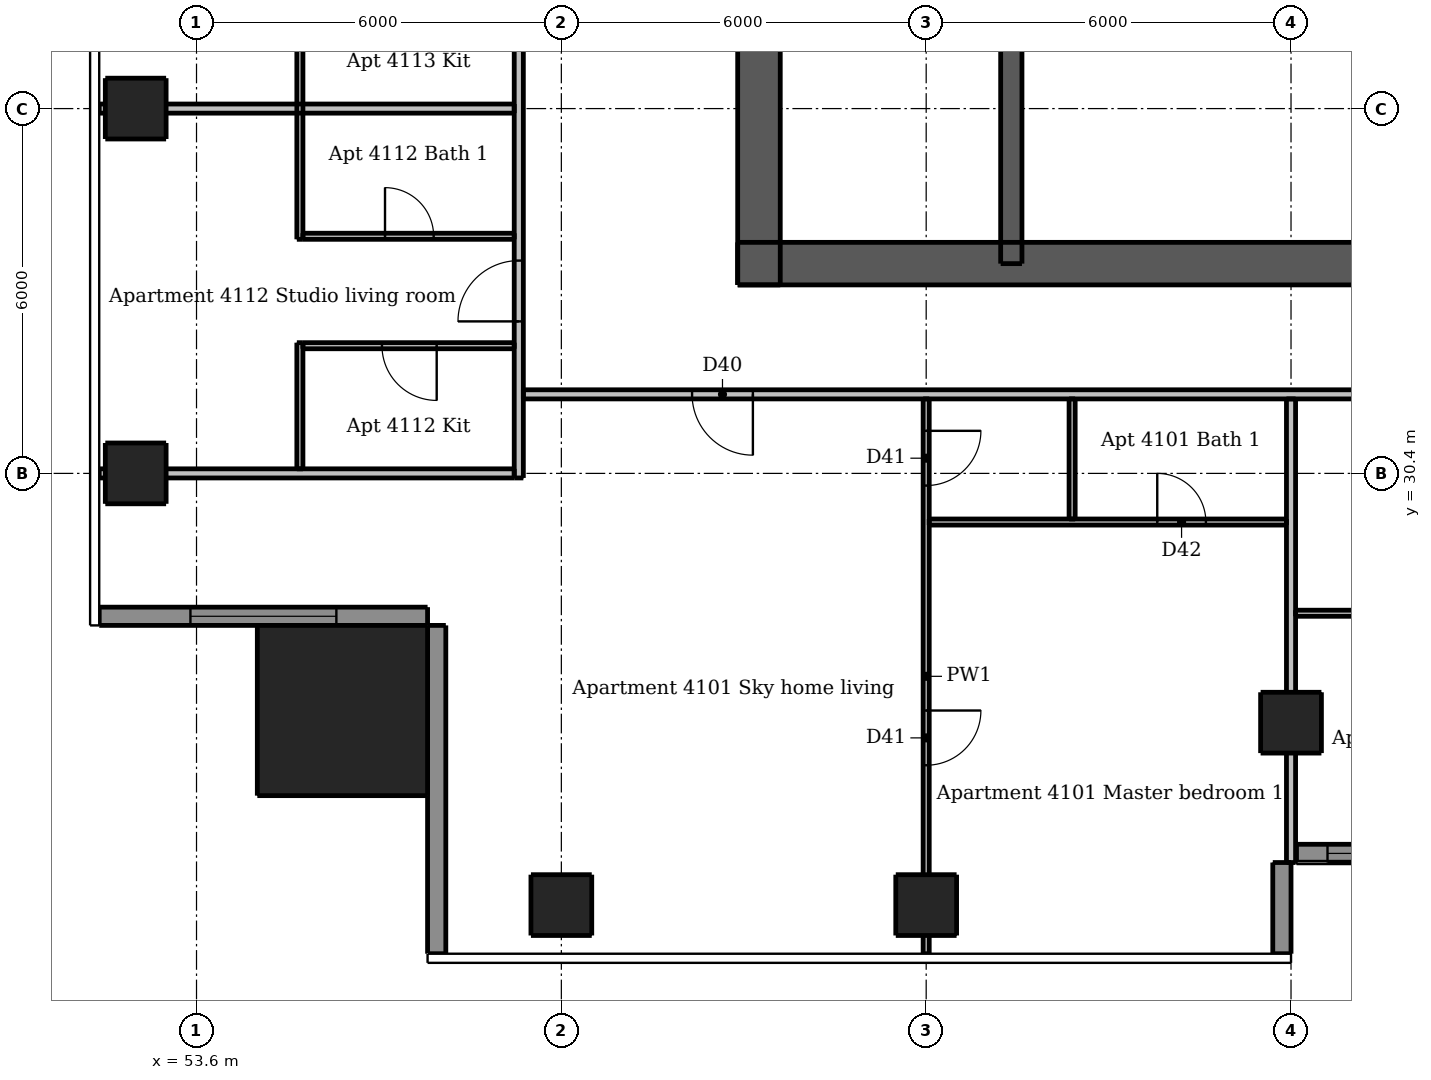
"""IFC4 building model, lengths in metres.
Left out: names, types, materials, properties, quantities, classifications, styles, units other than length and angle.
Written with IfcOpenShell. Run it as: python <this file> out.ifc"""

import sys

from ifc_helpers import new_model, si_unit, direction, frame, frame_2d, origin, origin_2d, place, context, subcontext, project, spatial, rectangle, extrude, element, fill, save


model = new_model("IFC4")
c1 = context("Model", 3, precision=1e-05, world=origin(), true_north=direction((0.0, 1.0)))
c2 = subcontext(c1, "Body", "Model", "MODEL_VIEW")
j1 = project(units=[si_unit("LENGTHUNIT", "METRE"), si_unit("PLANEANGLEUNIT", "RADIAN")], contexts=[c1])
p1 = place(None, origin())
s1 = spatial("IfcSite", under=j1, at=p1, CompositionType="ELEMENT")
p2 = place(p1, origin())
s2 = spatial("IfcBuilding", under=s1, at=p2, CompositionType="ELEMENT")
p3 = place(p2, frame((0.0, 0.0, 154.9)))
s3 = spatial("IfcBuildingStorey", under=s2, at=p3, CompositionType="ELEMENT", Elevation=154.9)
p4 = place(p3, frame((62.5, 33.85, 0.0), z_axis=(0.0, 0.0, 1.0), x_axis=(1.0, 0.0, 0.0)))
e1 = element("IfcWall", 1, at=p4, inside=s3, PredefinedType="SHEAR", context=c2, shape_type="SweptSolid", body=[
    extrude(rectangle(XDim=24.0, YDim=0.7, at=frame_2d((12.0, 0.0))), origin(), (0.0, 0.0, 1.0), 3.05),
])
p5 = place(p4, frame((1.962, 0.0, 0.0)))
e2 = element("IfcOpeningElement", 2, at=p5, cuts=e1, PredefinedType="OPENING", context=c2, shape_type="SweptSolid", body=[
    extrude(rectangle(XDim=1.1, YDim=2.1, at=frame_2d((0.55, 1.05))), frame((0.0, 0.36, 0.0), z_axis=(0.0, -1.0, 0.0), x_axis=(1.0, 0.0, 0.0)), (0.0, 0.0, 1.0), 0.72),
])
p6 = place(p4, frame((20.938, 0.0, 0.0)))
e3 = element("IfcOpeningElement", 3, at=p6, cuts=e1, PredefinedType="OPENING", context=c2, shape_type="SweptSolid", body=[
    extrude(rectangle(XDim=1.1, YDim=2.1, at=frame_2d((0.55, 1.05))), frame((0.0, 0.36, 0.0), z_axis=(0.0, -1.0, 0.0), x_axis=(1.0, 0.0, 0.0)), (0.0, 0.0, 1.0), 0.72),
])
p7 = place(p4, frame((8.0, 0.0, 0.0)))
e4 = element("IfcOpeningElement", 4, at=p7, cuts=e1, PredefinedType="OPENING", context=c2, shape_type="SweptSolid", body=[
    extrude(rectangle(XDim=1.1, YDim=2.1, at=frame_2d((0.55, 1.05))), frame((0.0, 0.36, 0.0), z_axis=(0.0, -1.0, 0.0), x_axis=(1.0, 0.0, 0.0)), (0.0, 0.0, 1.0), 0.72),
])
p8 = place(p4, frame((13.512, 0.0, 0.0)))
e5 = element("IfcOpeningElement", 5, at=p8, cuts=e1, PredefinedType="OPENING", context=c2, shape_type="SweptSolid", body=[
    extrude(rectangle(XDim=0.9, YDim=2.1, at=frame_2d((0.45, 1.05))), frame((0.0, 0.36, 0.0), z_axis=(0.0, -1.0, 0.0), x_axis=(1.0, 0.0, 0.0)), (0.0, 0.0, 1.0), 0.72),
])
p9 = place(p4, frame((17.087, 0.0, 0.0)))
e6 = element("IfcOpeningElement", 6, at=p9, cuts=e1, PredefinedType="OPENING", context=c2, shape_type="SweptSolid", body=[
    extrude(rectangle(XDim=0.9, YDim=2.1, at=frame_2d((0.45, 1.05))), frame((0.0, 0.36, 0.0), z_axis=(0.0, -1.0, 0.0), x_axis=(1.0, 0.0, 0.0)), (0.0, 0.0, 1.0), 0.72),
])
p10 = place(p3, frame((62.85, 33.5, 0.0), z_axis=(0.0, 0.0, 1.0), x_axis=(0.0, 1.0, 0.0)))
e7 = element("IfcWall", 7, at=p10, inside=s3, PredefinedType="SHEAR", context=c2, shape_type="SweptSolid", body=[
    extrude(rectangle(XDim=24.0, YDim=0.7, at=frame_2d((12.0, 0.0))), origin(), (0.0, 0.0, 1.0), 3.05),
])
p11 = place(p10, frame((11.2, 0.0, 0.0)))
e8 = element("IfcOpeningElement", 8, at=p11, cuts=e7, PredefinedType="OPENING", context=c2, shape_type="SweptSolid", body=[
    extrude(rectangle(XDim=1.6, YDim=2.1, at=frame_2d((0.8, 1.05))), frame((0.0, 0.36, 0.0), z_axis=(0.0, -1.0, 0.0), x_axis=(1.0, 0.0, 0.0)), (0.0, 0.0, 1.0), 0.72),
])
p12 = place(p3, frame((67.0, 33.85, 0.0), z_axis=(0.0, 0.0, 1.0), x_axis=(0.0, 1.0, 0.0)))
e9 = element("IfcWall", 9, at=p12, inside=s3, PredefinedType="SHEAR", context=c2, shape_type="SweptSolid", body=[
    extrude(rectangle(XDim=10.05, YDim=0.35, at=frame_2d((5.025, 0.0))), origin(), (0.0, 0.0, 1.0), 3.05),
])
p13 = place(p12, frame((0.55, 0.0, 0.0)))
e10 = element("IfcOpeningElement", 10, at=p13, cuts=e9, PredefinedType="OPENING", context=c2, shape_type="SweptSolid", body=[
    extrude(rectangle(XDim=1.1, YDim=2.1, at=frame_2d((0.55, 1.05))), frame((0.0, 0.185, 0.0), z_axis=(0.0, -1.0, 0.0), x_axis=(1.0, 0.0, 0.0)), (0.0, 0.0, 1.0), 0.37),
])
for number, where, z_axis, x_axis in (
    (11, (59.6, 23.3, 0.0), (0.0, 0.0, 1.0), (1.0, 0.0, 0.0)),
    (12, (65.6, 23.3, 0.0), (0.0, 0.0, 1.0), (1.0, 0.0, 0.0)),
    (13, (71.6, 26.3, 0.0), (0.0, 0.0, 1.0), (1.0, 0.0, 0.0)),
    (14, (52.6, 30.4, 0.0), (0.0, 0.0, 1.0), (1.0, 0.0, 0.0)),
    (15, (52.6, 36.4, 0.0), (0.0, 0.0, 1.0), (1.0, 0.0, 0.0)),
):
    element("IfcColumn", number, at=place(p3, frame(where, z_axis=z_axis, x_axis=x_axis)), inside=s3, PredefinedType="COLUMN", context=c2, shape_type="SweptSolid", body=[
        extrude(rectangle(XDim=1.0, YDim=1.0, at=origin_2d()), origin(), (0.0, 0.0, 1.0), 3.05),
    ])
p14 = place(p3, frame((56.0, 26.5, 0.0), z_axis=(0.0, 0.0, 1.0), x_axis=(1.0, 0.0, 0.0)))
e16 = element("IfcColumn", 16, at=p14, inside=s3, PredefinedType="COLUMN", context=c2, shape_type="SweptSolid", body=[
    extrude(rectangle(XDim=2.8, YDim=2.8, at=origin_2d()), origin(), (0.0, 0.0, 1.0), 3.3),
])
p15 = place(p3, frame((71.45, 22.5, 0.0), z_axis=(0.0, 0.0, 1.0), x_axis=(0.0, 1.0, 0.0)))
e17 = element("IfcWall", 17, at=p15, inside=s3, PredefinedType="SOLIDWALL", context=c2, shape_type="SweptSolid", body=[
    extrude(rectangle(XDim=1.5, YDim=0.3, at=frame_2d((0.75, 0.0))), origin(), (0.0, 0.0, 1.0), 3.05),
])
p16 = place(p3, frame((52.0, 28.05, 0.0), z_axis=(0.0, 0.0, 1.0), x_axis=(1.0, 0.0, 0.0)))
e18 = element("IfcWall", 18, at=p16, inside=s3, PredefinedType="SOLIDWALL", context=c2, shape_type="SweptSolid", body=[
    extrude(rectangle(XDim=5.4, YDim=0.3, at=frame_2d((2.7, 0.0))), origin(), (0.0, 0.0, 1.0), 3.05),
])
p17 = place(p16, frame((1.5, 0.0, 0.15)))
e19 = element("IfcOpeningElement", 19, at=p17, cuts=e18, PredefinedType="OPENING", context=c2, shape_type="SweptSolid", body=[
    extrude(rectangle(XDim=2.4, YDim=2.1, at=frame_2d((1.2, 1.05))), frame((0.0, 0.16, 0.0), z_axis=(0.0, -1.0, 0.0), x_axis=(1.0, 0.0, 0.0)), (0.0, 0.0, 1.0), 0.32),
])
p18 = place(p3, frame((57.55, 27.9, 0.0), z_axis=(0.0, 0.0, 1.0), x_axis=(0.0, -1.0, 0.0)))
e20 = element("IfcWall", 20, at=p18, inside=s3, PredefinedType="SOLIDWALL", context=c2, shape_type="SweptSolid", body=[
    extrude(rectangle(XDim=5.4, YDim=0.3, at=frame_2d((2.7, 0.0))), origin(), (0.0, 0.0, 1.0), 3.05),
])
p19 = place(p3, frame((71.69, 24.15, 0.0), z_axis=(0.0, 0.0, 1.0), x_axis=(1.0, 0.0, 0.0)))
e21 = element("IfcWall", 21, at=p19, inside=s3, PredefinedType="SOLIDWALL", context=c2, shape_type="SweptSolid", body=[
    extrude(rectangle(XDim=5.91, YDim=0.3, at=frame_2d((2.955, 0.0))), origin(), (0.0, 0.0, 1.0), 3.05),
])
p20 = place(p19, frame((0.51, 0.0, 0.15)))
e22 = element("IfcOpeningElement", 22, at=p20, cuts=e21, PredefinedType="OPENING", context=c2, shape_type="SweptSolid", body=[
    extrude(rectangle(XDim=1.8, YDim=2.1, at=frame_2d((0.9, 1.05))), frame((0.0, 0.16, 0.0), z_axis=(0.0, -1.0, 0.0), x_axis=(1.0, 0.0, 0.0)), (0.0, 0.0, 1.0), 0.32),
])
p21 = place(p19, frame((3.51, 0.0, 0.15)))
e23 = element("IfcOpeningElement", 23, at=p21, cuts=e21, PredefinedType="OPENING", context=c2, shape_type="SweptSolid", body=[
    extrude(rectangle(XDim=1.8, YDim=2.1, at=frame_2d((0.9, 1.05))), frame((0.0, 0.16, 0.0), z_axis=(0.0, -1.0, 0.0), x_axis=(1.0, 0.0, 0.0)), (0.0, 0.0, 1.0), 0.32),
])
p22 = place(p3, frame((55.3, 30.475, 0.0), z_axis=(0.0, 0.0, 1.0), x_axis=(0.0, 1.0, 0.0)))
e24 = element("IfcWall", 24, at=p22, inside=s3, PredefinedType="PARTITIONING", context=c2, shape_type="SweptSolid", body=[
    extrude(rectangle(XDim=2.075, YDim=0.1, at=frame_2d((1.038, 0.0))), origin(), (0.0, 0.0, 1.0), 3.05),
])
p23 = place(p3, frame((55.3, 34.25, 0.0), z_axis=(0.0, 0.0, 1.0), x_axis=(0.0, 1.0, 0.0)))
e25 = element("IfcWall", 25, at=p23, inside=s3, PredefinedType="PARTITIONING", context=c2, shape_type="SweptSolid", body=[
    extrude(rectangle(XDim=4.3, YDim=0.1, at=frame_2d((2.15, 0.0))), origin(), (0.0, 0.0, 1.0), 3.05),
])
p24 = place(p3, frame((65.6, 31.625, 0.0), z_axis=(0.0, 0.0, 1.0), x_axis=(0.0, -1.0, 0.0)))
e26 = element("IfcWall", 26, at=p24, inside=s3, PredefinedType="PARTITIONING", context=c2, shape_type="SweptSolid", body=[
    extrude(rectangle(XDim=9.125, YDim=0.1, at=frame_2d((4.562, 0.0))), origin(), (0.0, 0.0, 1.0), 2.516),
])
p25 = place(p24, frame((0.525, 0.0, 0.0)))
e27 = element("IfcOpeningElement", 27, at=p25, cuts=e26, PredefinedType="OPENING", context=c2, shape_type="SweptSolid", body=[
    extrude(rectangle(XDim=0.9, YDim=2.1, at=frame_2d((0.45, 1.05))), frame((0.0, 0.06, 0.0), z_axis=(0.0, -1.0, 0.0), x_axis=(1.0, 0.0, 0.0)), (0.0, 0.0, 1.0), 0.12),
])
p26 = place(p24, frame((5.125, 0.0, 0.0)))
e28 = element("IfcOpeningElement", 28, at=p26, cuts=e26, PredefinedType="OPENING", context=c2, shape_type="SweptSolid", body=[
    extrude(rectangle(XDim=0.9, YDim=2.1, at=frame_2d((0.45, 1.05))), frame((0.0, 0.06, 0.0), z_axis=(0.0, -1.0, 0.0), x_axis=(1.0, 0.0, 0.0)), (0.0, 0.0, 1.0), 0.12),
])
p27 = place(p3, frame((68.0, 29.65, 0.0), z_axis=(0.0, 0.0, 1.0), x_axis=(0.0, 1.0, 0.0)))
e29 = element("IfcWall", 29, at=p27, inside=s3, PredefinedType="PARTITIONING", context=c2, shape_type="SweptSolid", body=[
    extrude(rectangle(XDim=1.975, YDim=0.1, at=frame_2d((0.988, 0.0))), origin(), (0.0, 0.0, 1.0), 3.05),
])
p28 = place(p3, frame((55.35, 34.3, 0.0), z_axis=(0.0, 0.0, 1.0), x_axis=(1.0, 0.0, 0.0)))
e30 = element("IfcWall", 30, at=p28, inside=s3, PredefinedType="PARTITIONING", context=c2, shape_type="SweptSolid", body=[
    extrude(rectangle(XDim=3.475, YDim=0.1, at=frame_2d((1.737, 0.0))), origin(), (0.0, 0.0, 1.0), 3.05),
])
p29 = place(p28, frame((1.35, 0.0, 0.0)))
e31 = element("IfcOpeningElement", 31, at=p29, cuts=e30, PredefinedType="OPENING", context=c2, shape_type="SweptSolid", body=[
    extrude(rectangle(XDim=0.8, YDim=2.1, at=frame_2d((0.4, 1.05))), frame((0.0, 0.06, 0.0), z_axis=(0.0, -1.0, 0.0), x_axis=(1.0, 0.0, 0.0)), (0.0, 0.0, 1.0), 0.12),
])
p30 = place(p3, frame((58.825, 32.5, 0.0), z_axis=(0.0, 0.0, 1.0), x_axis=(-1.0, 0.0, 0.0)))
e32 = element("IfcWall", 32, at=p30, inside=s3, PredefinedType="PARTITIONING", context=c2, shape_type="SweptSolid", body=[
    extrude(rectangle(XDim=3.475, YDim=0.1, at=frame_2d((1.737, 0.0))), origin(), (0.0, 0.0, 1.0), 3.05),
])
p31 = place(p30, frame((1.275, 0.0, 0.0)))
e33 = element("IfcOpeningElement", 33, at=p31, cuts=e32, PredefinedType="OPENING", context=c2, shape_type="SweptSolid", body=[
    extrude(rectangle(XDim=0.9, YDim=2.1, at=frame_2d((0.45, 1.05))), frame((0.0, 0.06, 0.0), z_axis=(0.0, -1.0, 0.0), x_axis=(1.0, 0.0, 0.0)), (0.0, 0.0, 1.0), 0.12),
])
p32 = place(p3, frame((65.65, 29.6, 0.0), z_axis=(0.0, 0.0, 1.0), x_axis=(1.0, 0.0, 0.0)))
e34 = element("IfcWall", 34, at=p32, inside=s3, PredefinedType="PARTITIONING", context=c2, shape_type="SweptSolid", body=[
    extrude(rectangle(XDim=5.875, YDim=0.1, at=frame_2d((2.938, 0.0))), origin(), (0.0, 0.0, 1.0), 3.05),
])
p33 = place(p32, frame((3.75, 0.0, 0.0)))
e35 = element("IfcOpeningElement", 35, at=p33, cuts=e34, PredefinedType="OPENING", context=c2, shape_type="SweptSolid", body=[
    extrude(rectangle(XDim=0.8, YDim=2.1, at=frame_2d((0.4, 1.05))), frame((0.0, 0.06, 0.0), z_axis=(0.0, -1.0, 0.0), x_axis=(1.0, 0.0, 0.0)), (0.0, 0.0, 1.0), 0.12),
])
p34 = place(p3, frame((71.675, 28.1, 0.0), z_axis=(0.0, 0.0, 1.0), x_axis=(1.0, 0.0, 0.0)))
e36 = element("IfcWall", 36, at=p34, inside=s3, PredefinedType="PARTITIONING", context=c2, shape_type="SweptSolid", body=[
    extrude(rectangle(XDim=1.975, YDim=0.1, at=frame_2d((0.987, 0.0))), origin(), (0.0, 0.0, 1.0), 3.05),
])
p35 = place(p3, frame((58.9, 30.325, 0.0), z_axis=(0.0, 0.0, 1.0), x_axis=(0.0, 1.0, 0.0)))
e37 = element("IfcWall", 37, at=p35, inside=s3, PredefinedType="PARTITIONING", context=c2, shape_type="SweptSolid", body=[
    extrude(rectangle(XDim=30.85, YDim=0.15, at=frame_2d((15.425, 0.0))), origin(), (0.0, 0.0, 1.0), 3.05),
])
p36 = place(p35, frame((2.575, 0.0, 0.0)))
e38 = element("IfcOpeningElement", 38, at=p36, cuts=e37, PredefinedType="OPENING", context=c2, shape_type="SweptSolid", body=[
    extrude(rectangle(XDim=1.0, YDim=2.1, at=frame_2d((0.5, 1.05))), frame((0.0, 0.085, 0.0), z_axis=(0.0, -1.0, 0.0), x_axis=(1.0, 0.0, 0.0)), (0.0, 0.0, 1.0), 0.17),
])
p37 = place(p35, frame((8.575, 0.0, 0.0)))
e39 = element("IfcOpeningElement", 39, at=p37, cuts=e37, PredefinedType="OPENING", context=c2, shape_type="SweptSolid", body=[
    extrude(rectangle(XDim=1.0, YDim=2.1, at=frame_2d((0.5, 1.05))), frame((0.0, 0.085, 0.0), z_axis=(0.0, -1.0, 0.0), x_axis=(1.0, 0.0, 0.0)), (0.0, 0.0, 1.0), 0.17),
])
p38 = place(p35, frame((14.575, 0.0, 0.0)))
e40 = element("IfcOpeningElement", 40, at=p38, cuts=e37, PredefinedType="OPENING", context=c2, shape_type="SweptSolid", body=[
    extrude(rectangle(XDim=1.0, YDim=2.1, at=frame_2d((0.5, 1.05))), frame((0.0, 0.085, 0.0), z_axis=(0.0, -1.0, 0.0), x_axis=(1.0, 0.0, 0.0)), (0.0, 0.0, 1.0), 0.17),
])
p39 = place(p35, frame((26.925, 0.0, 0.0)))
e41 = element("IfcOpeningElement", 41, at=p39, cuts=e37, PredefinedType="OPENING", context=c2, shape_type="SweptSolid", body=[
    extrude(rectangle(XDim=1.0, YDim=2.1, at=frame_2d((0.5, 1.05))), frame((0.0, 0.085, 0.0), z_axis=(0.0, -1.0, 0.0), x_axis=(1.0, 0.0, 0.0)), (0.0, 0.0, 1.0), 0.17),
])
p40 = place(p3, frame((71.6, 24.0, 0.0), z_axis=(0.0, 0.0, 1.0), x_axis=(0.0, 1.0, 0.0)))
e42 = element("IfcWall", 42, at=p40, inside=s3, PredefinedType="PARTITIONING", context=c2, shape_type="SweptSolid", body=[
    extrude(rectangle(XDim=7.625, YDim=0.15, at=frame_2d((3.812, 0.0))), origin(), (0.0, 0.0, 1.0), 2.59),
])
p41 = place(p3, frame((52.0, 36.4, 0.0), z_axis=(0.0, 0.0, 1.0), x_axis=(1.0, 0.0, 0.0)))
e43 = element("IfcWall", 43, at=p41, inside=s3, PredefinedType="PARTITIONING", context=c2, shape_type="SweptSolid", body=[
    extrude(rectangle(XDim=6.825, YDim=0.15, at=frame_2d((3.413, 0.0))), origin(), (0.0, 0.0, 1.0), 2.516),
])
p42 = place(p3, frame((89.525, 31.7, 0.0), z_axis=(0.0, 0.0, 1.0), x_axis=(-1.0, 0.0, 0.0)))
e44 = element("IfcWall", 44, at=p42, inside=s3, PredefinedType="PARTITIONING", context=c2, shape_type="SweptSolid", body=[
    extrude(rectangle(XDim=30.55, YDim=0.15, at=frame_2d((15.275, 0.0))), origin(), (0.0, 0.0, 1.0), 3.05),
])
p43 = place(p42, frame((26.775, 0.0, 0.0)))
e45 = element("IfcOpeningElement", 45, at=p43, cuts=e44, PredefinedType="OPENING", context=c2, shape_type="SweptSolid", body=[
    extrude(rectangle(XDim=1.0, YDim=2.1, at=frame_2d((0.5, 1.05))), frame((0.0, 0.085, 0.0), z_axis=(0.0, -1.0, 0.0), x_axis=(1.0, 0.0, 0.0)), (0.0, 0.0, 1.0), 0.17),
])
p44 = place(p42, frame((14.425, 0.0, 0.0)))
e46 = element("IfcOpeningElement", 46, at=p44, cuts=e44, PredefinedType="OPENING", context=c2, shape_type="SweptSolid", body=[
    extrude(rectangle(XDim=1.0, YDim=2.1, at=frame_2d((0.5, 1.05))), frame((0.0, 0.085, 0.0), z_axis=(0.0, -1.0, 0.0), x_axis=(1.0, 0.0, 0.0)), (0.0, 0.0, 1.0), 0.17),
])
p45 = place(p42, frame((6.575, 0.0, 0.0)))
e47 = element("IfcOpeningElement", 47, at=p45, cuts=e44, PredefinedType="OPENING", context=c2, shape_type="SweptSolid", body=[
    extrude(rectangle(XDim=1.0, YDim=2.1, at=frame_2d((0.5, 1.05))), frame((0.0, 0.085, 0.0), z_axis=(0.0, -1.0, 0.0), x_axis=(1.0, 0.0, 0.0)), (0.0, 0.0, 1.0), 0.17),
])
p46 = place(p3, frame((52.0, 30.4, 0.0), z_axis=(0.0, 0.0, 1.0), x_axis=(1.0, 0.0, 0.0)))
e48 = element("IfcWall", 48, at=p46, inside=s3, PredefinedType="PARTITIONING", context=c2, shape_type="SweptSolid", body=[
    extrude(rectangle(XDim=6.825, YDim=0.15, at=frame_2d((3.413, 0.0))), origin(), (0.0, 0.0, 1.0), 2.647),
])
p47 = place(p17, origin())
e49 = element("IfcWindow", 49, at=p47, inside=s3, PartitioningType="DOUBLE_PANEL_VERTICAL", PredefinedType="WINDOW", context=c2, shape_type="SweptSolid", body=[
    extrude(rectangle(XDim=2.4, YDim=2.1, at=frame_2d((1.2, 1.05))), frame((0.0, 0.03, 0.0), z_axis=(0.0, -1.0, 0.0), x_axis=(1.0, 0.0, 0.0)), (0.0, 0.0, 1.0), 0.06),
])
fill(e19, e49)
p48 = place(p20, origin())
e50 = element("IfcWindow", 50, at=p48, inside=s3, PartitioningType="DOUBLE_PANEL_VERTICAL", PredefinedType="WINDOW", context=c2, shape_type="SweptSolid", body=[
    extrude(rectangle(XDim=1.8, YDim=2.1, at=frame_2d((0.9, 1.05))), frame((0.0, 0.03, 0.0), z_axis=(0.0, -1.0, 0.0), x_axis=(1.0, 0.0, 0.0)), (0.0, 0.0, 1.0), 0.06),
])
fill(e22, e50)
p49 = place(p5, origin())
e51 = element("IfcDoor", 51, at=p49, inside=s3, OperationType="SINGLE_SWING_LEFT", PredefinedType="DOOR", context=c2, shape_type="SweptSolid", body=[
    extrude(rectangle(XDim=1.1, YDim=2.1, at=frame_2d((0.55, 1.05))), frame((0.0, 0.337, 0.0), z_axis=(0.0, -1.0, 0.0), x_axis=(1.0, 0.0, 0.0)), (0.0, 0.0, 1.0), 0.05),
])
fill(e2, e51)
p50 = place(p7, origin())
e52 = element("IfcDoor", 52, at=p50, inside=s3, OperationType="SINGLE_SWING_LEFT", PredefinedType="DOOR", context=c2, shape_type="SweptSolid", body=[
    extrude(rectangle(XDim=1.1, YDim=2.1, at=frame_2d((0.55, 1.05))), frame((0.0, 0.337, 0.0), z_axis=(0.0, -1.0, 0.0), x_axis=(1.0, 0.0, 0.0)), (0.0, 0.0, 1.0), 0.05),
])
fill(e4, e52)
p51 = place(p13, origin())
e53 = element("IfcDoor", 53, at=p51, inside=s3, OperationType="SINGLE_SWING_RIGHT", PredefinedType="DOOR", context=c2, shape_type="SweptSolid", body=[
    extrude(rectangle(XDim=1.1, YDim=2.1, at=frame_2d((0.55, 1.05))), frame((0.0, -0.112, 0.0), z_axis=(0.0, -1.0, 0.0), x_axis=(1.0, 0.0, 0.0)), (0.0, 0.0, 1.0), 0.05),
])
fill(e10, e53)
p52 = place(p43, origin())
e54 = element("IfcDoor", 54, at=p52, inside=s3, OperationType="SINGLE_SWING_LEFT", PredefinedType="DOOR", context=c2, shape_type="SweptSolid", body=[
    extrude(rectangle(XDim=1.0, YDim=2.1, at=frame_2d((0.5, 1.05))), frame((0.0, 0.025, 0.0), z_axis=(0.0, -1.0, 0.0), x_axis=(1.0, 0.0, 0.0)), (0.0, 0.0, 1.0), 0.05),
])
fill(e45, e54)
p53 = place(p25, origin())
e55 = element("IfcDoor", 55, at=p53, inside=s3, OperationType="SINGLE_SWING_LEFT", PredefinedType="DOOR", context=c2, shape_type="SweptSolid", body=[
    extrude(rectangle(XDim=0.9, YDim=2.1, at=frame_2d((0.45, 1.05))), frame((0.0, 0.025, 0.0), z_axis=(0.0, -1.0, 0.0), x_axis=(1.0, 0.0, 0.0)), (0.0, 0.0, 1.0), 0.05),
])
fill(e27, e55)
p54 = place(p26, origin())
e56 = element("IfcDoor", 56, at=p54, inside=s3, OperationType="SINGLE_SWING_LEFT", PredefinedType="DOOR", context=c2, shape_type="SweptSolid", body=[
    extrude(rectangle(XDim=0.9, YDim=2.1, at=frame_2d((0.45, 1.05))), frame((0.0, 0.025, 0.0), z_axis=(0.0, -1.0, 0.0), x_axis=(1.0, 0.0, 0.0)), (0.0, 0.0, 1.0), 0.05),
])
fill(e28, e56)
p55 = place(p33, origin())
e57 = element("IfcDoor", 57, at=p55, inside=s3, OperationType="SINGLE_SWING_LEFT", PredefinedType="DOOR", context=c2, shape_type="SweptSolid", body=[
    extrude(rectangle(XDim=0.8, YDim=2.1, at=frame_2d((0.4, 1.05))), frame((0.0, 0.025, 0.0), z_axis=(0.0, -1.0, 0.0), x_axis=(1.0, 0.0, 0.0)), (0.0, 0.0, 1.0), 0.05),
])
fill(e35, e57)
p56 = place(p36, origin())
e58 = element("IfcDoor", 58, at=p56, inside=s3, OperationType="SINGLE_SWING_LEFT", PredefinedType="DOOR", context=c2, shape_type="SweptSolid", body=[
    extrude(rectangle(XDim=1.0, YDim=2.1, at=frame_2d((0.5, 1.05))), frame((0.0, 0.025, 0.0), z_axis=(0.0, -1.0, 0.0), x_axis=(1.0, 0.0, 0.0)), (0.0, 0.0, 1.0), 0.05),
])
fill(e38, e58)
p57 = place(p31, origin())
e59 = element("IfcDoor", 59, at=p57, inside=s3, OperationType="SINGLE_SWING_LEFT", PredefinedType="DOOR", context=c2, shape_type="SweptSolid", body=[
    extrude(rectangle(XDim=0.9, YDim=2.1, at=frame_2d((0.45, 1.05))), frame((0.0, 0.025, 0.0), z_axis=(0.0, -1.0, 0.0), x_axis=(1.0, 0.0, 0.0)), (0.0, 0.0, 1.0), 0.05),
])
fill(e33, e59)
p58 = place(p29, origin())
e60 = element("IfcDoor", 60, at=p58, inside=s3, OperationType="SINGLE_SWING_LEFT", PredefinedType="DOOR", context=c2, shape_type="SweptSolid", body=[
    extrude(rectangle(XDim=0.8, YDim=2.1, at=frame_2d((0.4, 1.05))), frame((0.0, 0.025, 0.0), z_axis=(0.0, -1.0, 0.0), x_axis=(1.0, 0.0, 0.0)), (0.0, 0.0, 1.0), 0.05),
])
fill(e31, e60)
save(model, sys.argv[1])
